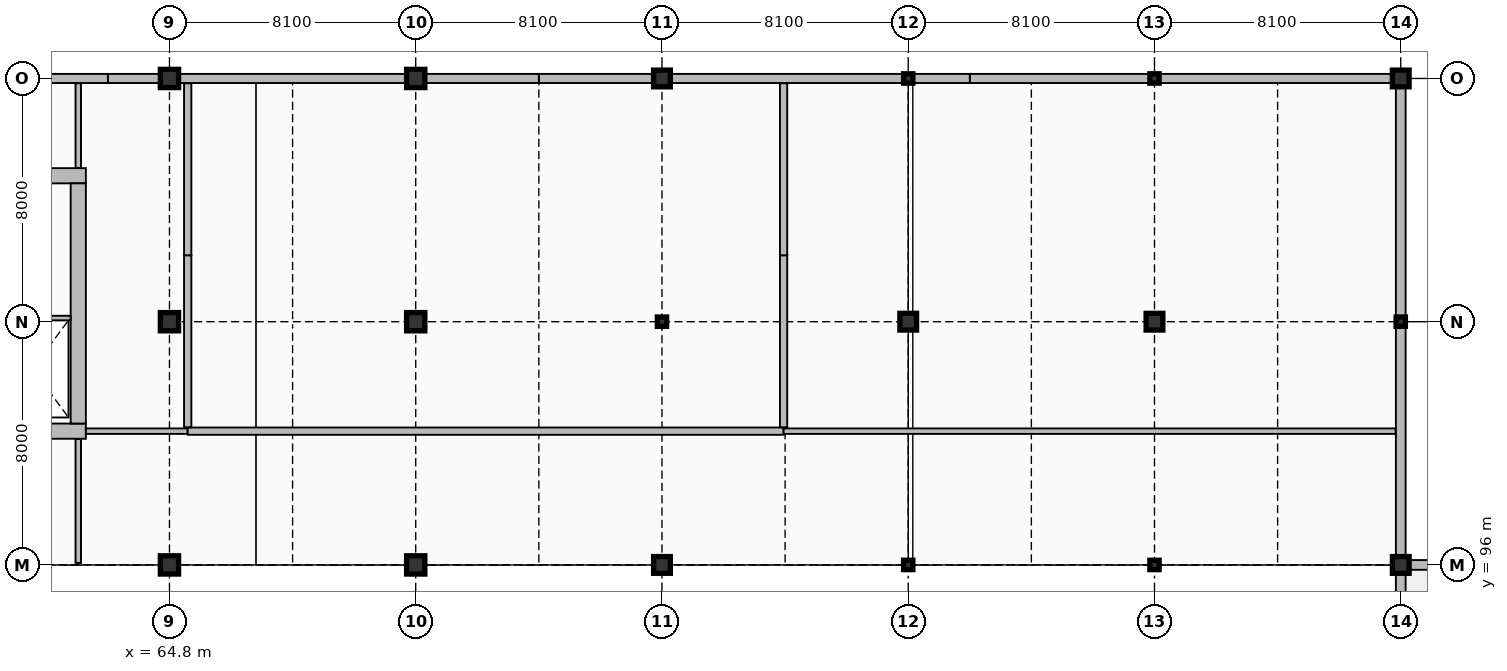
"""IFC4 building model, lengths in metres.
Left out: names, types, materials, properties, quantities, classifications, styles, units other than length and angle.
Written with IfcOpenShell. Run it as: python <this file> out.ifc"""

import sys

from ifc_helpers import new_model, si_unit, direction, frame, frame_2d, origin, origin_2d, place, context, subcontext, project, spatial, rectangle, i_section, extrude, element, fill, save


model = new_model("IFC4")
c1 = context("Model", 3, precision=1e-05, world=origin(), true_north=direction((0.0, 1.0)))
c2 = subcontext(c1, "Body", "Model", "MODEL_VIEW")
j1 = project(units=[si_unit("LENGTHUNIT", "METRE"), si_unit("PLANEANGLEUNIT", "RADIAN")], contexts=[c1])
p1 = place(None, origin())
s1 = spatial("IfcSite", under=j1, at=p1, CompositionType="ELEMENT")
p2 = place(p1, origin())
s2 = spatial("IfcBuilding", under=s1, at=p2, CompositionType="ELEMENT")
p3 = place(p2, frame((0.0, 0.0, 19.8)))
s3 = spatial("IfcBuildingStorey", under=s2, at=p3, CompositionType="ELEMENT", Elevation=19.8)
p4 = place(p3, frame((46.75, 100.4, 0.0), z_axis=(0.0, 0.0, 1.0), x_axis=(1.0, 0.0, 0.0)))
e1 = element("IfcWall", 1, at=p4, inside=s3, PredefinedType="SHEAR", context=c2, shape_type="SweptSolid", body=[
    extrude(rectangle(XDim=15.3, YDim=0.5, at=frame_2d((7.65, 0.0))), origin(), (0.0, 0.0, 1.0), 5.1),
])
p5 = place(p4, frame((1.0, 0.0, 0.0)))
e2 = element("IfcOpeningElement", 2, at=p5, cuts=e1, PredefinedType="OPENING", context=c2, shape_type="SweptSolid", body=[
    extrude(rectangle(XDim=1.15, YDim=2.25, at=frame_2d((0.575, 1.125))), frame((0.0, 0.26, 0.0), z_axis=(0.0, -1.0, 0.0), x_axis=(1.0, 0.0, 0.0)), (0.0, 0.0, 1.0), 0.52),
])
p6 = place(p4, frame((10.282, 0.0, 0.0)))
e3 = element("IfcOpeningElement", 3, at=p6, cuts=e1, PredefinedType="OPENING", context=c2, shape_type="SweptSolid", body=[
    extrude(rectangle(XDim=1.1, YDim=2.2, at=frame_2d((0.55, 1.1))), frame((0.0, 0.26, 0.0), z_axis=(0.0, -1.0, 0.0), x_axis=(1.0, 0.0, 0.0)), (0.0, 0.0, 1.0), 0.52),
])
p7 = place(p4, frame((12.998, 0.0, 0.0)))
e4 = element("IfcOpeningElement", 4, at=p7, cuts=e1, PredefinedType="OPENING", context=c2, shape_type="SweptSolid", body=[
    extrude(rectangle(XDim=1.1, YDim=2.2, at=frame_2d((0.55, 1.1))), frame((0.0, 0.26, 0.0), z_axis=(0.0, -1.0, 0.0), x_axis=(1.0, 0.0, 0.0)), (0.0, 0.0, 1.0), 0.52),
])
p8 = place(p3, frame((46.75, 108.8, 0.0), z_axis=(0.0, 0.0, 1.0), x_axis=(1.0, 0.0, 0.0)))
e5 = element("IfcWall", 5, at=p8, inside=s3, PredefinedType="SHEAR", context=c2, shape_type="SweptSolid", body=[
    extrude(rectangle(XDim=15.3, YDim=0.5, at=frame_2d((7.65, 0.0))), origin(), (0.0, 0.0, 1.0), 5.1),
])
p9 = place(p3, frame((61.8, 100.65, 0.0), z_axis=(0.0, 0.0, 1.0), x_axis=(0.0, 1.0, 0.0)))
e6 = element("IfcWall", 6, at=p9, inside=s3, PredefinedType="SHEAR", context=c2, shape_type="SweptSolid", body=[
    extrude(rectangle(XDim=7.9, YDim=0.5, at=frame_2d((3.95, 0.0))), origin(), (0.0, 0.0, 1.0), 5.1),
])
for number, where, z_axis, x_axis in (
    (7, (64.8, 96.0, 0.0), (0.0, 0.0, 1.0), (1.0, 0.0, 0.0)),
    (8, (64.8, 104.0, 0.0), (0.0, 0.0, 1.0), (1.0, 0.0, 0.0)),
    (9, (64.8, 112.0, 0.0), (0.0, 0.0, 1.0), (1.0, 0.0, 0.0)),
    (10, (72.9, 96.0, 0.0), (0.0, 0.0, 1.0), (1.0, 0.0, 0.0)),
    (11, (72.9, 104.0, 0.0), (0.0, 0.0, 1.0), (1.0, 0.0, 0.0)),
    (12, (72.9, 112.0, 0.0), (0.0, 0.0, 1.0), (1.0, 0.0, 0.0)),
):
    element("IfcColumn", number, at=place(p3, frame(where, z_axis=z_axis, x_axis=x_axis)), inside=s3, PredefinedType="COLUMN", context=c2, shape_type="SweptSolid", body=[
        extrude(rectangle(XDim=0.6, YDim=0.6, at=origin_2d()), origin(), (0.0, 0.0, 1.0), 5.1),
    ])
p10 = place(p3, frame((81.0, 96.0, 0.0), z_axis=(0.0, 0.0, 1.0), x_axis=(1.0, 0.0, 0.0)))
e13 = element("IfcColumn", 13, at=p10, inside=s3, PredefinedType="COLUMN", context=c2, shape_type="SweptSolid", body=[
    extrude(rectangle(XDim=0.55, YDim=0.55, at=origin_2d()), origin(), (0.0, 0.0, 1.0), 5.1),
])
p11 = place(p3, frame((81.0, 104.0, 0.0), z_axis=(0.0, 0.0, 1.0), x_axis=(1.0, 0.0, 0.0)))
e14 = element("IfcColumn", 14, at=p11, inside=s3, PredefinedType="COLUMN", context=c2, shape_type="SweptSolid", body=[
    extrude(i_section(OverallWidth=0.305, OverallDepth=0.308, WebThickness=0.01, FlangeThickness=0.015, FilletRadius=0.015, at=origin_2d()), origin(), (0.0, 0.0, 1.0), 5.1),
])
p12 = place(p3, frame((81.0, 112.0, 0.0), z_axis=(0.0, 0.0, 1.0), x_axis=(1.0, 0.0, 0.0)))
e15 = element("IfcColumn", 15, at=p12, inside=s3, PredefinedType="COLUMN", context=c2, shape_type="SweptSolid", body=[
    extrude(rectangle(XDim=0.55, YDim=0.55, at=origin_2d()), origin(), (0.0, 0.0, 1.0), 5.1),
])
p13 = place(p3, frame((89.1, 96.0, 0.0), z_axis=(0.0, 0.0, 1.0), x_axis=(1.0, 0.0, 0.0)))
e16 = element("IfcColumn", 16, at=p13, inside=s3, PredefinedType="COLUMN", context=c2, shape_type="SweptSolid", body=[
    extrude(i_section(OverallWidth=0.305, OverallDepth=0.308, WebThickness=0.01, FlangeThickness=0.015, FilletRadius=0.015, at=origin_2d()), origin(), (0.0, 0.0, 1.0), 5.1),
])
p14 = place(p3, frame((89.1, 104.0, 0.0), z_axis=(0.0, 0.0, 1.0), x_axis=(1.0, 0.0, 0.0)))
e17 = element("IfcColumn", 17, at=p14, inside=s3, PredefinedType="COLUMN", context=c2, shape_type="SweptSolid", body=[
    extrude(rectangle(XDim=0.55, YDim=0.55, at=origin_2d()), origin(), (0.0, 0.0, 1.0), 5.1),
])
p15 = place(p3, frame((89.1, 112.0, 0.0), z_axis=(0.0, 0.0, 1.0), x_axis=(1.0, 0.0, 0.0)))
e18 = element("IfcColumn", 18, at=p15, inside=s3, PredefinedType="COLUMN", context=c2, shape_type="SweptSolid", body=[
    extrude(i_section(OverallWidth=0.305, OverallDepth=0.308, WebThickness=0.01, FlangeThickness=0.015, FilletRadius=0.015, at=origin_2d()), origin(), (0.0, 0.0, 1.0), 5.1),
])
p16 = place(p3, frame((97.2, 96.0, 0.0), z_axis=(0.0, 0.0, 1.0), x_axis=(1.0, 0.0, 0.0)))
e19 = element("IfcColumn", 19, at=p16, inside=s3, PredefinedType="COLUMN", context=c2, shape_type="SweptSolid", body=[
    extrude(i_section(OverallWidth=0.305, OverallDepth=0.308, WebThickness=0.01, FlangeThickness=0.015, FilletRadius=0.015, at=origin_2d()), origin(), (0.0, 0.0, 1.0), 4.76),
])
p17 = place(p3, frame((97.2, 104.0, 0.0), z_axis=(0.0, 0.0, 1.0), x_axis=(1.0, 0.0, 0.0)))
e20 = element("IfcColumn", 20, at=p17, inside=s3, PredefinedType="COLUMN", context=c2, shape_type="SweptSolid", body=[
    extrude(rectangle(XDim=0.55, YDim=0.55, at=origin_2d()), origin(), (0.0, 0.0, 1.0), 4.76),
])
p18 = place(p3, frame((97.2, 112.0, 0.0), z_axis=(0.0, 0.0, 1.0), x_axis=(1.0, 0.0, 0.0)))
e21 = element("IfcColumn", 21, at=p18, inside=s3, PredefinedType="COLUMN", context=c2, shape_type="SweptSolid", body=[
    extrude(i_section(OverallWidth=0.305, OverallDepth=0.308, WebThickness=0.01, FlangeThickness=0.015, FilletRadius=0.015, at=origin_2d()), origin(), (0.0, 0.0, 1.0), 4.76),
])
p19 = place(p3, frame((105.3, 96.0, 0.0), z_axis=(0.0, 0.0, 1.0), x_axis=(1.0, 0.0, 0.0)))
e22 = element("IfcColumn", 22, at=p19, inside=s3, PredefinedType="COLUMN", context=c2, shape_type="SweptSolid", body=[
    extrude(rectangle(XDim=0.55, YDim=0.55, at=origin_2d()), origin(), (0.0, 0.0, 1.0), 4.76),
])
p20 = place(p3, frame((105.3, 104.0, 0.0), z_axis=(0.0, 0.0, 1.0), x_axis=(1.0, 0.0, 0.0)))
e23 = element("IfcColumn", 23, at=p20, inside=s3, PredefinedType="COLUMN", context=c2, shape_type="SweptSolid", body=[
    extrude(i_section(OverallWidth=0.305, OverallDepth=0.308, WebThickness=0.01, FlangeThickness=0.015, FilletRadius=0.015, at=origin_2d()), origin(), (0.0, 0.0, 1.0), 4.76),
])
p21 = place(p3, frame((105.3, 112.0, 0.0), z_axis=(0.0, 0.0, 1.0), x_axis=(1.0, 0.0, 0.0)))
e24 = element("IfcColumn", 24, at=p21, inside=s3, PredefinedType="COLUMN", context=c2, shape_type="SweptSolid", body=[
    extrude(rectangle(XDim=0.55, YDim=0.55, at=origin_2d()), origin(), (0.0, 0.0, 1.0), 4.76),
])
p22 = place(p3, frame((105.3, 96.18, 0.0), z_axis=(0.0, 0.0, 1.0), x_axis=(0.0, 1.0, 0.0)))
e25 = element("IfcWall", 25, at=p22, inside=s3, PredefinedType="SOLIDWALL", context=c2, shape_type="SweptSolid", body=[
    extrude(rectangle(XDim=15.82, YDim=0.32, at=frame_2d((7.91, 0.0))), origin(), (0.0, 0.0, 1.0), 4.289),
])
p23 = place(p3, frame((105.3, 112.0, 0.0), z_axis=(0.0, 0.0, 1.0), x_axis=(-1.0, 0.0, 0.0)))
e26 = element("IfcWall", 26, at=p23, inside=s3, PredefinedType="SOLIDWALL", context=c2, shape_type="SweptSolid", body=[
    extrude(rectangle(XDim=14.175, YDim=0.3, at=frame_2d((7.087, 0.0))), origin(), (0.0, 0.0, 1.0), 4.202),
])
p24 = place(p23, frame((3.15, 0.0, 0.95)))
e27 = element("IfcOpeningElement", 27, at=p24, cuts=e26, PredefinedType="OPENING", context=c2, shape_type="SweptSolid", body=[
    extrude(rectangle(XDim=3.6, YDim=0.9, at=frame_2d((1.8, 0.45))), frame((0.0, 0.16, 0.0), z_axis=(0.0, -1.0, 0.0), x_axis=(1.0, 0.0, 0.0)), (0.0, 0.0, 1.0), 0.32),
])
p25 = place(p3, frame((91.125, 112.0, 0.0), z_axis=(0.0, 0.0, 1.0), x_axis=(-1.0, 0.0, 0.0)))
e28 = element("IfcWall", 28, at=p25, inside=s3, PredefinedType="SOLIDWALL", context=c2, shape_type="SweptSolid", body=[
    extrude(rectangle(XDim=14.175, YDim=0.3, at=frame_2d((7.087, 0.0))), origin(), (0.0, 0.0, 1.0), 4.202),
])
p26 = place(p3, frame((76.95, 112.0, 0.0), z_axis=(0.0, 0.0, 1.0), x_axis=(-1.0, 0.0, 0.0)))
e29 = element("IfcWall", 29, at=p26, inside=s3, PredefinedType="SOLIDWALL", context=c2, shape_type="SweptSolid", body=[
    extrude(rectangle(XDim=14.175, YDim=0.3, at=frame_2d((7.087, 0.0))), origin(), (0.0, 0.0, 1.0), 4.302),
])
p27 = place(p26, frame((6.3, 0.0, 0.95)))
e30 = element("IfcOpeningElement", 30, at=p27, cuts=e29, PredefinedType="OPENING", context=c2, shape_type="SweptSolid", body=[
    extrude(rectangle(XDim=1.6, YDim=1.4, at=frame_2d((0.8, 0.7))), frame((0.0, 0.16, 0.0), z_axis=(0.0, -1.0, 0.0), x_axis=(1.0, 0.0, 0.0)), (0.0, 0.0, 1.0), 0.32),
])
p28 = place(p3, frame((62.775, 112.0, 0.0), z_axis=(0.0, 0.0, 1.0), x_axis=(-1.0, 0.0, 0.0)))
e31 = element("IfcWall", 31, at=p28, inside=s3, PredefinedType="SOLIDWALL", context=c2, shape_type="SweptSolid", body=[
    extrude(rectangle(XDim=14.175, YDim=0.3, at=frame_2d((7.087, 0.0))), origin(), (0.0, 0.0, 1.0), 4.302),
])
p29 = place(p28, frame((9.0, 0.0, 0.95)))
e32 = element("IfcOpeningElement", 32, at=p29, cuts=e31, PredefinedType="OPENING", context=c2, shape_type="SweptSolid", body=[
    extrude(rectangle(XDim=0.9, YDim=1.8, at=frame_2d((0.45, 0.9))), frame((0.0, 0.16, 0.0), z_axis=(0.0, -1.0, 0.0), x_axis=(1.0, 0.0, 0.0)), (0.0, 0.0, 1.0), 0.32),
])
p30 = place(p3, frame((117.54, 96.0, 0.0), z_axis=(0.0, 0.0, 1.0), x_axis=(-1.0, 0.0, 0.0)))
e33 = element("IfcWall", 33, at=p30, inside=s3, PredefinedType="SOLIDWALL", context=c2, shape_type="SweptSolid", body=[
    extrude(rectangle(XDim=12.06, YDim=0.32, at=frame_2d((6.03, 0.0))), origin(), (0.0, 0.0, 1.0), 4.86),
])
p31 = place(p30, frame((6.75, 0.0, 0.95)))
e34 = element("IfcOpeningElement", 34, at=p31, cuts=e33, PredefinedType="OPENING", context=c2, shape_type="SweptSolid", body=[
    extrude(rectangle(XDim=2.1, YDim=1.8, at=frame_2d((1.05, 0.9))), frame((0.0, 0.17, 0.0), z_axis=(0.0, -1.0, 0.0), x_axis=(1.0, 0.0, 0.0)), (0.0, 0.0, 1.0), 0.34),
])
p32 = place(p3, frame((105.3, 95.82, 0.0), z_axis=(0.0, 0.0, 1.0), x_axis=(0.0, -1.0, 0.0)))
e35 = element("IfcWall", 35, at=p32, inside=s3, PredefinedType="SOLIDWALL", context=c2, shape_type="SweptSolid", body=[
    extrude(rectangle(XDim=13.273, YDim=0.32, at=frame_2d((6.637, 0.0))), origin(), (0.0, 0.0, 1.0), 4.86),
])
p33 = place(p32, frame((3.6, 0.0, 0.95)))
e36 = element("IfcOpeningElement", 36, at=p33, cuts=e35, PredefinedType="OPENING", context=c2, shape_type="SweptSolid", body=[
    extrude(rectangle(XDim=2.25, YDim=1.8, at=frame_2d((1.125, 0.9))), frame((0.0, 0.17, 0.0), z_axis=(0.0, -1.0, 0.0), x_axis=(1.0, 0.0, 0.0)), (0.0, 0.0, 1.0), 0.34),
])
p34 = place(p3, frame((56.3, 104.12, 0.0), z_axis=(0.0, 0.0, 1.0), x_axis=(1.0, 0.0, 0.0)))
e37 = element("IfcWall", 37, at=p34, inside=s3, PredefinedType="PARTITIONING", context=c2, shape_type="SweptSolid", body=[
    extrude(rectangle(XDim=5.25, YDim=0.15, at=frame_2d((2.625, 0.0))), origin(), (0.0, 0.0, 1.0), 4.86),
])
p35 = place(p3, frame((62.05, 100.4, 0.0), z_axis=(0.0, 0.0, 1.0), x_axis=(1.0, 0.0, 0.0)))
e38 = element("IfcWall", 38, at=p35, inside=s3, PredefinedType="PARTITIONING", context=c2, shape_type="SweptSolid", body=[
    extrude(rectangle(XDim=3.35, YDim=0.18, at=frame_2d((1.675, 0.0))), origin(), (0.0, 0.0, 1.0), 4.86),
])
p36 = place(p35, frame((1.075, 0.0, 0.0)))
e39 = element("IfcOpeningElement", 39, at=p36, cuts=e38, PredefinedType="OPENING", context=c2, shape_type="SweptSolid", body=[
    extrude(rectangle(XDim=1.2, YDim=2.2, at=frame_2d((0.6, 1.1))), frame((0.0, 0.1, 0.0), z_axis=(0.0, -1.0, 0.0), x_axis=(1.0, 0.0, 0.0)), (0.0, 0.0, 1.0), 0.2),
])
p37 = place(p3, frame((65.4, 100.4, 0.0), z_axis=(0.0, 0.0, 1.0), x_axis=(1.0, 0.0, 0.0)))
e40 = element("IfcWall", 40, at=p37, inside=s3, PredefinedType="PARTITIONING", context=c2, shape_type="SweptSolid", body=[
    extrude(rectangle(XDim=19.6, YDim=0.24, at=frame_2d((9.8, 0.0))), origin(), (0.0, 0.0, 1.0), 4.86),
])
p38 = place(p37, frame((9.2, 0.0, 0.0)))
e41 = element("IfcOpeningElement", 41, at=p38, cuts=e40, PredefinedType="OPENING", context=c2, shape_type="SweptSolid", body=[
    extrude(rectangle(XDim=1.2, YDim=2.3, at=frame_2d((0.6, 1.15))), frame((0.0, 0.13, 0.0), z_axis=(0.0, -1.0, 0.0), x_axis=(1.0, 0.0, 0.0)), (0.0, 0.0, 1.0), 0.26),
])
p39 = place(p3, frame((85.0, 100.4, 0.0), z_axis=(0.0, 0.0, 1.0), x_axis=(1.0, 0.0, 0.0)))
e42 = element("IfcWall", 42, at=p39, inside=s3, PredefinedType="PARTITIONING", context=c2, shape_type="SweptSolid", body=[
    extrude(rectangle(XDim=20.132, YDim=0.18, at=frame_2d((10.066, 0.0))), origin(), (0.0, 0.0, 1.0), 4.86),
])
p40 = place(p39, frame((9.466, 0.0, 0.0)))
e43 = element("IfcOpeningElement", 43, at=p40, cuts=e42, PredefinedType="OPENING", context=c2, shape_type="SweptSolid", body=[
    extrude(rectangle(XDim=1.2, YDim=2.3, at=frame_2d((0.6, 1.15))), frame((0.0, 0.1, 0.0), z_axis=(0.0, -1.0, 0.0), x_axis=(1.0, 0.0, 0.0)), (0.0, 0.0, 1.0), 0.2),
])
p41 = place(p3, frame((61.8, 96.065, 0.0), z_axis=(0.0, 0.0, 1.0), x_axis=(0.0, 1.0, 0.0)))
e44 = element("IfcWall", 44, at=p41, inside=s3, PredefinedType="PARTITIONING", context=c2, shape_type="SweptSolid", body=[
    extrude(rectangle(XDim=4.077, YDim=0.18, at=frame_2d((2.039, 0.0))), origin(), (0.0, 0.0, 1.0), 4.86),
])
p42 = place(p41, frame((1.489, 0.0, 0.0)))
e45 = element("IfcOpeningElement", 45, at=p42, cuts=e44, PredefinedType="OPENING", context=c2, shape_type="SweptSolid", body=[
    extrude(rectangle(XDim=1.1, YDim=2.2, at=frame_2d((0.55, 1.1))), frame((0.0, 0.1, 0.0), z_axis=(0.0, -1.0, 0.0), x_axis=(1.0, 0.0, 0.0)), (0.0, 0.0, 1.0), 0.2),
])
p43 = place(p3, frame((61.8, 109.058, 0.0), z_axis=(0.0, 0.0, 1.0), x_axis=(0.0, 1.0, 0.0)))
e46 = element("IfcWall", 46, at=p43, inside=s3, PredefinedType="PARTITIONING", context=c2, shape_type="SweptSolid", body=[
    extrude(rectangle(XDim=2.784, YDim=0.18, at=frame_2d((1.392, 0.0))), origin(), (0.0, 0.0, 1.0), 4.86),
])
p44 = place(p43, frame((0.842, 0.0, 0.0)))
e47 = element("IfcOpeningElement", 47, at=p44, cuts=e46, PredefinedType="OPENING", context=c2, shape_type="SweptSolid", body=[
    extrude(rectangle(XDim=1.1, YDim=2.2, at=frame_2d((0.55, 1.1))), frame((0.0, 0.1, 0.0), z_axis=(0.0, -1.0, 0.0), x_axis=(1.0, 0.0, 0.0)), (0.0, 0.0, 1.0), 0.2),
])
for number, where, z_axis, x_axis in (
    (48, (65.4, 100.528, 0.0), (0.0, 0.0, 1.0), (0.0, 1.0, 0.0)),
    (49, (65.4, 106.185, 0.0), (0.0, 0.0, 1.0), (0.0, 1.0, 0.0)),
):
    element("IfcWall", number, at=place(p3, frame(where, z_axis=z_axis, x_axis=x_axis)), inside=s3, PredefinedType="PARTITIONING", context=c2, shape_type="SweptSolid", body=[
        extrude(rectangle(XDim=5.657, YDim=0.24, at=frame_2d((2.829, 0.0))), origin(), (0.0, 0.0, 1.0), 4.86),
    ])
for number, where, z_axis, x_axis in (
    (50, (85.0, 100.528, 0.0), (0.0, 0.0, 1.0), (0.0, 1.0, 0.0)),
    (51, (85.0, 106.185, 0.0), (0.0, 0.0, 1.0), (0.0, 1.0, 0.0)),
):
    element("IfcWall", number, at=place(p3, frame(where, z_axis=z_axis, x_axis=x_axis)), inside=s3, PredefinedType="PARTITIONING", context=c2, shape_type="SweptSolid", body=[
        extrude(rectangle(XDim=5.657, YDim=0.24, at=frame_2d((2.829, 0.0))), origin(), (0.0, 0.0, 1.0), 4.498),
    ])
p45 = place(p24, origin())
e52 = element("IfcWindow", 52, at=p45, inside=s3, PartitioningType="TRIPLE_PANEL_VERTICAL", PredefinedType="WINDOW", context=c2, shape_type="SweptSolid", body=[
    extrude(rectangle(XDim=3.6, YDim=0.9, at=frame_2d((1.8, 0.45))), frame((0.0, 0.03, 0.0), z_axis=(0.0, -1.0, 0.0), x_axis=(1.0, 0.0, 0.0)), (0.0, 0.0, 1.0), 0.06),
])
fill(e27, e52)
p46 = place(p27, origin())
e53 = element("IfcWindow", 53, at=p46, inside=s3, PartitioningType="SINGLE_PANEL", PredefinedType="WINDOW", context=c2, shape_type="SweptSolid", body=[
    extrude(rectangle(XDim=1.6, YDim=1.4, at=frame_2d((0.8, 0.7))), frame((0.0, 0.03, 0.0), z_axis=(0.0, -1.0, 0.0), x_axis=(1.0, 0.0, 0.0)), (0.0, 0.0, 1.0), 0.06),
])
fill(e30, e53)
p47 = place(p36, frame((1.2, 0.0, 0.0), z_axis=(0.0, 0.0, 1.0), x_axis=(-1.0, 0.0, 0.0)))
e54 = element("IfcDoor", 54, at=p47, inside=s3, OperationType="SINGLE_SWING_LEFT", PredefinedType="DOOR", context=c2, shape_type="SweptSolid", body=[
    extrude(rectangle(XDim=1.2, YDim=2.2, at=frame_2d((0.6, 1.1))), frame((0.0, 0.025, 0.0), z_axis=(0.0, -1.0, 0.0), x_axis=(1.0, 0.0, 0.0)), (0.0, 0.0, 1.0), 0.05),
])
fill(e39, e54)
p48 = place(p38, origin())
e55 = element("IfcDoor", 55, at=p48, inside=s3, OperationType="SINGLE_SWING_RIGHT", PredefinedType="DOOR", context=c2, shape_type="SweptSolid", body=[
    extrude(rectangle(XDim=1.2, YDim=2.3, at=frame_2d((0.6, 1.15))), frame((0.0, 0.025, 0.0), z_axis=(0.0, -1.0, 0.0), x_axis=(1.0, 0.0, 0.0)), (0.0, 0.0, 1.0), 0.05),
])
fill(e41, e55)
p49 = place(p40, origin())
e56 = element("IfcDoor", 56, at=p49, inside=s3, OperationType="SINGLE_SWING_LEFT", PredefinedType="DOOR", context=c2, shape_type="SweptSolid", body=[
    extrude(rectangle(XDim=1.2, YDim=2.3, at=frame_2d((0.6, 1.15))), frame((0.0, 0.025, 0.0), z_axis=(0.0, -1.0, 0.0), x_axis=(1.0, 0.0, 0.0)), (0.0, 0.0, 1.0), 0.05),
])
fill(e43, e56)
p50 = place(p42, frame((1.1, 0.0, 0.0), z_axis=(0.0, 0.0, 1.0), x_axis=(-1.0, 0.0, 0.0)))
e57 = element("IfcDoor", 57, at=p50, inside=s3, OperationType="SINGLE_SWING_RIGHT", PredefinedType="DOOR", context=c2, shape_type="SweptSolid", body=[
    extrude(rectangle(XDim=1.1, YDim=2.2, at=frame_2d((0.55, 1.1))), frame((0.0, 0.025, 0.0), z_axis=(0.0, -1.0, 0.0), x_axis=(1.0, 0.0, 0.0)), (0.0, 0.0, 1.0), 0.05),
])
fill(e45, e57)
p51 = place(p44, origin())
e58 = element("IfcDoor", 58, at=p51, inside=s3, OperationType="SINGLE_SWING_LEFT", PredefinedType="DOOR", context=c2, shape_type="SweptSolid", body=[
    extrude(rectangle(XDim=1.1, YDim=2.2, at=frame_2d((0.55, 1.1))), frame((0.0, 0.025, 0.0), z_axis=(0.0, -1.0, 0.0), x_axis=(1.0, 0.0, 0.0)), (0.0, 0.0, 1.0), 0.05),
])
fill(e47, e58)
save(model, sys.argv[1])
